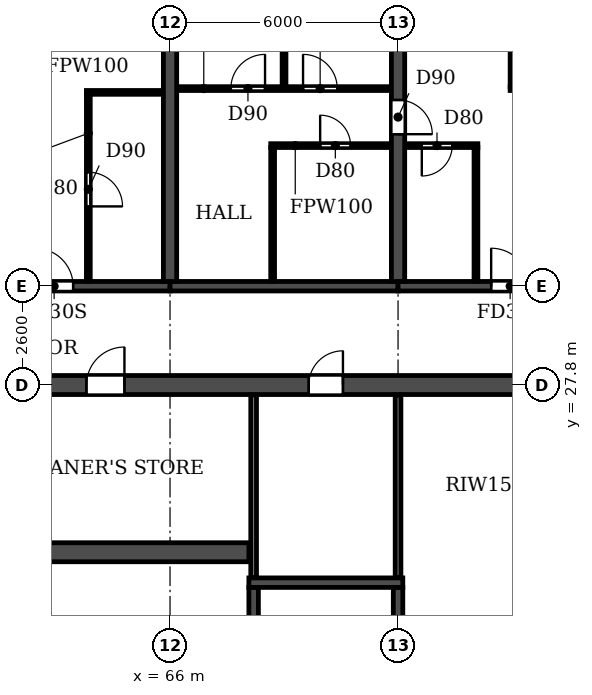
"""IFC4 building model, lengths in metres.
Left out: names, types, materials, properties, quantities, classifications, styles, units other than length and angle.
Written with IfcOpenShell. Run it as: python <this file> out.ifc"""

import sys

from ifc_helpers import new_model, si_unit, direction, frame, frame_2d, origin, place, context, subcontext, project, spatial, rectangle, extrude, element, fill, save


model = new_model("IFC4")
c1 = context("Model", 3, precision=1e-05, world=origin(), true_north=direction((0.0, 1.0)))
c2 = subcontext(c1, "Body", "Model", "MODEL_VIEW")
j1 = project(units=[si_unit("LENGTHUNIT", "METRE"), si_unit("PLANEANGLEUNIT", "RADIAN")], contexts=[c1])
p1 = place(None, origin())
s1 = spatial("IfcSite", under=j1, at=p1, CompositionType="ELEMENT")
p2 = place(p1, origin())
s2 = spatial("IfcBuilding", under=s1, at=p2, CompositionType="ELEMENT")
p3 = place(p2, frame((0.0, 0.0, 102.6)))
s3 = spatial("IfcBuildingStorey", under=s2, at=p3, CompositionType="ELEMENT", Elevation=102.6)
p4 = place(p3, frame((66.0, 30.525, 0.0), z_axis=(0.0, 0.0, 1.0), x_axis=(0.0, 1.0, 0.0)))
e1 = element("IfcWall", 1, at=p4, inside=s3, PredefinedType="SHEAR", context=c2, shape_type="SweptSolid", body=[
    extrude(rectangle(XDim=12.875, YDim=0.35, at=frame_2d((6.438, 0.0))), origin(), (0.0, 0.0, 1.0), 3.0),
])
p5 = place(p3, frame((72.0, 30.525, 0.0), z_axis=(0.0, 0.0, 1.0), x_axis=(0.0, 1.0, 0.0)))
e2 = element("IfcWall", 2, at=p5, inside=s3, PredefinedType="SHEAR", context=c2, shape_type="SweptSolid", body=[
    extrude(rectangle(XDim=12.875, YDim=0.35, at=frame_2d((6.438, 0.0))), origin(), (0.0, 0.0, 1.0), 3.0),
])
p6 = place(p5, frame((3.875, 0.0, 0.0)))
e3 = element("IfcOpeningElement", 3, at=p6, cuts=e2, PredefinedType="OPENING", context=c2, shape_type="SweptSolid", body=[
    extrude(rectangle(XDim=0.9, YDim=2.1, at=frame_2d((0.45, 1.05))), frame((0.0, 0.185, 0.0), z_axis=(0.0, -1.0, 0.0), x_axis=(1.0, 0.0, 0.0)), (0.0, 0.0, 1.0), 0.37),
])
p7 = place(p3, frame((60.0, 30.4, 0.0), z_axis=(0.0, 0.0, 1.0), x_axis=(1.0, 0.0, 0.0)))
e4 = element("IfcWall", 4, at=p7, inside=s3, PredefinedType="SHEAR", context=c2, shape_type="SweptSolid", body=[
    extrude(rectangle(XDim=6.0, YDim=0.25, at=frame_2d((3.0, 0.0))), origin(), (0.0, 0.0, 1.0), 2.4),
])
p8 = place(p7, frame((2.45, 0.0, 0.0)))
e5 = element("IfcOpeningElement", 5, at=p8, cuts=e4, PredefinedType="OPENING", context=c2, shape_type="SweptSolid", body=[
    extrude(rectangle(XDim=1.0, YDim=2.1, at=frame_2d((0.5, 1.05))), frame((0.0, 0.135, 0.0), z_axis=(0.0, -1.0, 0.0), x_axis=(1.0, 0.0, 0.0)), (0.0, 0.0, 1.0), 0.27),
])
p9 = place(p3, frame((66.0, 30.4, 0.0), z_axis=(0.0, 0.0, 1.0), x_axis=(1.0, 0.0, 0.0)))
e6 = element("IfcWall", 6, at=p9, inside=s3, PredefinedType="SHEAR", context=c2, shape_type="SweptSolid", body=[
    extrude(rectangle(XDim=6.0, YDim=0.25, at=frame_2d((3.0, 0.0))), origin(), (0.0, 0.0, 1.0), 2.4),
])
p10 = place(p3, frame((72.0, 30.4, 0.0), z_axis=(0.0, 0.0, 1.0), x_axis=(1.0, 0.0, 0.0)))
e7 = element("IfcWall", 7, at=p10, inside=s3, PredefinedType="SHEAR", context=c2, shape_type="SweptSolid", body=[
    extrude(rectangle(XDim=6.0, YDim=0.25, at=frame_2d((3.0, 0.0))), origin(), (0.0, 0.0, 1.0), 2.4),
])
p11 = place(p10, frame((2.45, 0.0, 0.0)))
e8 = element("IfcOpeningElement", 8, at=p11, cuts=e7, PredefinedType="OPENING", context=c2, shape_type="SweptSolid", body=[
    extrude(rectangle(XDim=1.0, YDim=2.1, at=frame_2d((0.5, 1.05))), frame((0.0, 0.135, 0.0), z_axis=(0.0, -1.0, 0.0), x_axis=(1.0, 0.0, 0.0)), (0.0, 0.0, 1.0), 0.27),
])
p12 = place(p3, frame((8.6, 27.8, 0.0), z_axis=(0.0, 0.0, 1.0), x_axis=(1.0, 0.0, 0.0)))
e9 = element("IfcWall", 9, at=p12, inside=s3, PredefinedType="SOLIDWALL", context=c2, shape_type="SweptSolid", body=[
    extrude(rectangle(XDim=84.8, YDim=0.5, at=frame_2d((42.4, 0.0))), origin(), (0.0, 0.0, 1.0), 3.0),
])
p13 = place(p12, frame((1.35, 0.0, 0.0)))
e10 = element("IfcOpeningElement", 10, at=p13, cuts=e9, PredefinedType="OPENING", context=c2, shape_type="SweptSolid", body=[
    extrude(rectangle(XDim=1.0, YDim=2.1, at=frame_2d((0.5, 1.05))), frame((0.0, 0.26, 0.0), z_axis=(0.0, -1.0, 0.0), x_axis=(1.0, 0.0, 0.0)), (0.0, 0.0, 1.0), 0.52),
])
p14 = place(p12, frame((6.05, 0.0, 0.0)))
e11 = element("IfcOpeningElement", 11, at=p14, cuts=e9, PredefinedType="OPENING", context=c2, shape_type="SweptSolid", body=[
    extrude(rectangle(XDim=1.0, YDim=2.1, at=frame_2d((0.5, 1.05))), frame((0.0, 0.26, 0.0), z_axis=(0.0, -1.0, 0.0), x_axis=(1.0, 0.0, 0.0)), (0.0, 0.0, 1.0), 0.52),
])
p15 = place(p12, frame((10.3, 0.0, 0.0)))
e12 = element("IfcOpeningElement", 12, at=p15, cuts=e9, PredefinedType="OPENING", context=c2, shape_type="SweptSolid", body=[
    extrude(rectangle(XDim=1.0, YDim=2.1, at=frame_2d((0.5, 1.05))), frame((0.0, 0.26, 0.0), z_axis=(0.0, -1.0, 0.0), x_axis=(1.0, 0.0, 0.0)), (0.0, 0.0, 1.0), 0.52),
])
p16 = place(p12, frame((13.65, 0.0, 0.0)))
e13 = element("IfcOpeningElement", 13, at=p16, cuts=e9, PredefinedType="OPENING", context=c2, shape_type="SweptSolid", body=[
    extrude(rectangle(XDim=0.9, YDim=2.1, at=frame_2d((0.45, 1.05))), frame((0.0, 0.26, 0.0), z_axis=(0.0, -1.0, 0.0), x_axis=(1.0, 0.0, 0.0)), (0.0, 0.0, 1.0), 0.52),
])
p17 = place(p12, frame((22.85, 0.0, 0.0)))
e14 = element("IfcOpeningElement", 14, at=p17, cuts=e9, PredefinedType="OPENING", context=c2, shape_type="SweptSolid", body=[
    extrude(rectangle(XDim=0.9, YDim=2.1, at=frame_2d((0.45, 1.05))), frame((0.0, 0.26, 0.0), z_axis=(0.0, -1.0, 0.0), x_axis=(1.0, 0.0, 0.0)), (0.0, 0.0, 1.0), 0.52),
])
p18 = place(p12, frame((28.6, 0.0, 0.0)))
e15 = element("IfcOpeningElement", 15, at=p18, cuts=e9, PredefinedType="OPENING", context=c2, shape_type="SweptSolid", body=[
    extrude(rectangle(XDim=1.0, YDim=2.1, at=frame_2d((0.5, 1.05))), frame((0.0, 0.26, 0.0), z_axis=(0.0, -1.0, 0.0), x_axis=(1.0, 0.0, 0.0)), (0.0, 0.0, 1.0), 0.52),
])
p19 = place(p12, frame((33.8, 0.0, 0.0)))
e16 = element("IfcOpeningElement", 16, at=p19, cuts=e9, PredefinedType="OPENING", context=c2, shape_type="SweptSolid", body=[
    extrude(rectangle(XDim=1.0, YDim=2.1, at=frame_2d((0.5, 1.05))), frame((0.0, 0.26, 0.0), z_axis=(0.0, -1.0, 0.0), x_axis=(1.0, 0.0, 0.0)), (0.0, 0.0, 1.0), 0.52),
])
p20 = place(p12, frame((39.0, 0.0, 0.0)))
e17 = element("IfcOpeningElement", 17, at=p20, cuts=e9, PredefinedType="OPENING", context=c2, shape_type="SweptSolid", body=[
    extrude(rectangle(XDim=1.0, YDim=2.1, at=frame_2d((0.5, 1.05))), frame((0.0, 0.26, 0.0), z_axis=(0.0, -1.0, 0.0), x_axis=(1.0, 0.0, 0.0)), (0.0, 0.0, 1.0), 0.52),
])
p21 = place(p12, frame((41.9, 0.0, 0.0)))
e18 = element("IfcOpeningElement", 18, at=p21, cuts=e9, PredefinedType="OPENING", context=c2, shape_type="SweptSolid", body=[
    extrude(rectangle(XDim=1.0, YDim=2.1, at=frame_2d((0.5, 1.05))), frame((0.0, 0.26, 0.0), z_axis=(0.0, -1.0, 0.0), x_axis=(1.0, 0.0, 0.0)), (0.0, 0.0, 1.0), 0.52),
])
p22 = place(p12, frame((44.8, 0.0, 0.0)))
e19 = element("IfcOpeningElement", 19, at=p22, cuts=e9, PredefinedType="OPENING", context=c2, shape_type="SweptSolid", body=[
    extrude(rectangle(XDim=1.0, YDim=2.1, at=frame_2d((0.5, 1.05))), frame((0.0, 0.26, 0.0), z_axis=(0.0, -1.0, 0.0), x_axis=(1.0, 0.0, 0.0)), (0.0, 0.0, 1.0), 0.52),
])
p23 = place(p12, frame((48.7, 0.0, 0.0)))
e20 = element("IfcOpeningElement", 20, at=p23, cuts=e9, PredefinedType="OPENING", context=c2, shape_type="SweptSolid", body=[
    extrude(rectangle(XDim=1.0, YDim=2.1, at=frame_2d((0.5, 1.05))), frame((0.0, 0.26, 0.0), z_axis=(0.0, -1.0, 0.0), x_axis=(1.0, 0.0, 0.0)), (0.0, 0.0, 1.0), 0.52),
])
p24 = place(p12, frame((55.2, 0.0, 0.0)))
e21 = element("IfcOpeningElement", 21, at=p24, cuts=e9, PredefinedType="OPENING", context=c2, shape_type="SweptSolid", body=[
    extrude(rectangle(XDim=1.0, YDim=2.1, at=frame_2d((0.5, 1.05))), frame((0.0, 0.26, 0.0), z_axis=(0.0, -1.0, 0.0), x_axis=(1.0, 0.0, 0.0)), (0.0, 0.0, 1.0), 0.52),
])
p25 = place(p12, frame((61.05, 0.0, 0.0)))
e22 = element("IfcOpeningElement", 22, at=p25, cuts=e9, PredefinedType="OPENING", context=c2, shape_type="SweptSolid", body=[
    extrude(rectangle(XDim=0.9, YDim=2.1, at=frame_2d((0.45, 1.05))), frame((0.0, 0.26, 0.0), z_axis=(0.0, -1.0, 0.0), x_axis=(1.0, 0.0, 0.0)), (0.0, 0.0, 1.0), 0.52),
])
p26 = place(p12, frame((70.25, 0.0, 0.0)))
e23 = element("IfcOpeningElement", 23, at=p26, cuts=e9, PredefinedType="OPENING", context=c2, shape_type="SweptSolid", body=[
    extrude(rectangle(XDim=0.9, YDim=2.1, at=frame_2d((0.45, 1.05))), frame((0.0, 0.26, 0.0), z_axis=(0.0, -1.0, 0.0), x_axis=(1.0, 0.0, 0.0)), (0.0, 0.0, 1.0), 0.52),
])
p27 = place(p12, frame((73.5, 0.0, 0.0)))
e24 = element("IfcOpeningElement", 24, at=p27, cuts=e9, PredefinedType="OPENING", context=c2, shape_type="SweptSolid", body=[
    extrude(rectangle(XDim=1.0, YDim=2.1, at=frame_2d((0.5, 1.05))), frame((0.0, 0.26, 0.0), z_axis=(0.0, -1.0, 0.0), x_axis=(1.0, 0.0, 0.0)), (0.0, 0.0, 1.0), 0.52),
])
p28 = place(p12, frame((77.95, 0.0, 0.0)))
e25 = element("IfcOpeningElement", 25, at=p28, cuts=e9, PredefinedType="OPENING", context=c2, shape_type="SweptSolid", body=[
    extrude(rectangle(XDim=1.5, YDim=2.1, at=frame_2d((0.75, 1.05))), frame((0.0, 0.26, 0.0), z_axis=(0.0, -1.0, 0.0), x_axis=(1.0, 0.0, 0.0)), (0.0, 0.0, 1.0), 0.52),
])
p29 = place(p12, frame((82.9, 0.0, 0.0)))
e26 = element("IfcOpeningElement", 26, at=p29, cuts=e9, PredefinedType="OPENING", context=c2, shape_type="SweptSolid", body=[
    extrude(rectangle(XDim=1.0, YDim=2.1, at=frame_2d((0.5, 1.05))), frame((0.0, 0.26, 0.0), z_axis=(0.0, -1.0, 0.0), x_axis=(1.0, 0.0, 0.0)), (0.0, 0.0, 1.0), 0.52),
])
p30 = place(p3, frame((33.925, 23.4, 0.0), z_axis=(0.0, 0.0, 1.0), x_axis=(1.0, 0.0, 0.0)))
e27 = element("IfcWall", 27, at=p30, inside=s3, PredefinedType="SOLIDWALL", context=c2, shape_type="SweptSolid", body=[
    extrude(rectangle(XDim=34.15, YDim=0.5, at=frame_2d((17.075, 0.0))), origin(), (0.0, 0.0, 1.0), 3.0),
])
p31 = place(p30, frame((16.175, 0.0, 0.0)))
e28 = element("IfcOpeningElement", 28, at=p31, cuts=e27, PredefinedType="OPENING", context=c2, shape_type="SweptSolid", body=[
    extrude(rectangle(XDim=1.8, YDim=2.1, at=frame_2d((0.9, 1.05))), frame((0.0, 0.26, 0.0), z_axis=(0.0, -1.0, 0.0), x_axis=(1.0, 0.0, 0.0)), (0.0, 0.0, 1.0), 0.52),
])
p32 = place(p30, frame((11.025, 0.0, 0.0)))
e29 = element("IfcOpeningElement", 29, at=p32, cuts=e27, PredefinedType="OPENING", context=c2, shape_type="SweptSolid", body=[
    extrude(rectangle(XDim=1.1, YDim=2.1, at=frame_2d((0.55, 1.05))), frame((0.0, 0.26, 0.0), z_axis=(0.0, -1.0, 0.0), x_axis=(1.0, 0.0, 0.0)), (0.0, 0.0, 1.0), 0.52),
])
p33 = place(p3, frame((68.2, 14.85, 0.0), z_axis=(0.0, 0.0, 1.0), x_axis=(0.0, 1.0, 0.0)))
e30 = element("IfcWall", 30, at=p33, inside=s3, PredefinedType="SOLIDWALL", context=c2, shape_type="SweptSolid", body=[
    extrude(rectangle(XDim=7.625, YDim=0.25, at=frame_2d((3.812, 0.0))), origin(), (0.0, 0.0, 1.0), 3.0),
])
p34 = place(p33, frame((0.45, 0.0, 0.0)))
e31 = element("IfcOpeningElement", 31, at=p34, cuts=e30, PredefinedType="OPENING", context=c2, shape_type="SweptSolid", body=[
    extrude(rectangle(XDim=1.0, YDim=2.1, at=frame_2d((0.5, 1.05))), frame((0.0, 0.135, 0.0), z_axis=(0.0, -1.0, 0.0), x_axis=(1.0, 0.0, 0.0)), (0.0, 0.0, 1.0), 0.27),
])
p35 = place(p3, frame((72.0, 14.85, 0.0), z_axis=(0.0, 0.0, 1.0), x_axis=(0.0, 1.0, 0.0)))
e32 = element("IfcWall", 32, at=p35, inside=s3, PredefinedType="SOLIDWALL", context=c2, shape_type="SweptSolid", body=[
    extrude(rectangle(XDim=7.625, YDim=0.25, at=frame_2d((3.812, 0.0))), origin(), (0.0, 0.0, 1.0), 3.0),
])
p36 = place(p3, frame((68.075, 22.6, 0.0), z_axis=(0.0, 0.0, 1.0), x_axis=(1.0, 0.0, 0.0)))
e33 = element("IfcWall", 33, at=p36, inside=s3, PredefinedType="SOLIDWALL", context=c2, shape_type="SweptSolid", body=[
    extrude(rectangle(XDim=4.05, YDim=0.25, at=frame_2d((2.025, 0.0))), origin(), (0.0, 0.0, 1.0), 3.0),
])
p37 = place(p3, frame((68.65, 34.1, 0.0), z_axis=(0.0, 0.0, 1.0), x_axis=(1.0, 0.0, 0.0)))
e34 = element("IfcWall", 34, at=p37, inside=s3, PredefinedType="PARTITIONING", context=c2, shape_type="SweptSolid", body=[
    extrude(rectangle(XDim=3.165, YDim=0.1, at=frame_2d((1.583, 0.0))), origin(), (0.0, 0.0, 1.0), 3.0),
])
p38 = place(p37, frame((1.3, 0.0, 0.0)))
e35 = element("IfcOpeningElement", 35, at=p38, cuts=e34, PredefinedType="OPENING", context=c2, shape_type="SweptSolid", body=[
    extrude(rectangle(XDim=0.8, YDim=2.1, at=frame_2d((0.4, 1.05))), frame((0.0, 0.06, 0.0), z_axis=(0.0, -1.0, 0.0), x_axis=(1.0, 0.0, 0.0)), (0.0, 0.0, 1.0), 0.12),
])
p39 = place(p3, frame((72.185, 34.1, 0.0), z_axis=(0.0, 0.0, 1.0), x_axis=(1.0, 0.0, 0.0)))
e36 = element("IfcWall", 36, at=p39, inside=s3, PredefinedType="PARTITIONING", context=c2, shape_type="SweptSolid", body=[
    extrude(rectangle(XDim=1.915, YDim=0.1, at=frame_2d((0.958, 0.0))), origin(), (0.0, 0.0, 1.0), 3.0),
])
p40 = place(p39, frame((0.44, 0.0, 0.0)))
e37 = element("IfcOpeningElement", 37, at=p40, cuts=e36, PredefinedType="OPENING", context=c2, shape_type="SweptSolid", body=[
    extrude(rectangle(XDim=0.8, YDim=2.1, at=frame_2d((0.4, 1.05))), frame((0.0, 0.06, 0.0), z_axis=(0.0, -1.0, 0.0), x_axis=(1.0, 0.0, 0.0)), (0.0, 0.0, 1.0), 0.12),
])
p41 = place(p3, frame((63.8, 35.5, 0.0), z_axis=(0.0, 0.0, 1.0), x_axis=(1.0, 0.0, 0.0)))
e38 = element("IfcWall", 38, at=p41, inside=s3, PredefinedType="PARTITIONING", context=c2, shape_type="SweptSolid", body=[
    extrude(rectangle(XDim=2.015, YDim=0.1, at=frame_2d((1.007, 0.0))), origin(), (0.0, 0.0, 1.0), 3.0),
])
p42 = place(p3, frame((66.185, 35.6, 0.0), z_axis=(0.0, 0.0, 1.0), x_axis=(1.0, 0.0, 0.0)))
e39 = element("IfcWall", 39, at=p42, inside=s3, PredefinedType="PARTITIONING", context=c2, shape_type="SweptSolid", body=[
    extrude(rectangle(XDim=5.63, YDim=0.1, at=frame_2d((2.815, 0.0))), origin(), (0.0, 0.0, 1.0), 3.0),
])
p43 = place(p42, frame((1.415, 0.0, 0.0)))
e40 = element("IfcOpeningElement", 40, at=p43, cuts=e39, PredefinedType="OPENING", context=c2, shape_type="SweptSolid", body=[
    extrude(rectangle(XDim=0.9, YDim=2.1, at=frame_2d((0.45, 1.05))), frame((0.0, 0.06, 0.0), z_axis=(0.0, -1.0, 0.0), x_axis=(1.0, 0.0, 0.0)), (0.0, 0.0, 1.0), 0.12),
])
p44 = place(p42, frame((3.315, 0.0, 0.0)))
e41 = element("IfcOpeningElement", 41, at=p44, cuts=e39, PredefinedType="OPENING", context=c2, shape_type="SweptSolid", body=[
    extrude(rectangle(XDim=0.9, YDim=2.1, at=frame_2d((0.45, 1.05))), frame((0.0, 0.06, 0.0), z_axis=(0.0, -1.0, 0.0), x_axis=(1.0, 0.0, 0.0)), (0.0, 0.0, 1.0), 0.12),
])
p45 = place(p3, frame((74.95, 35.6, 0.0), z_axis=(0.0, 0.0, 1.0), x_axis=(1.0, 0.0, 0.0)))
e42 = element("IfcWall", 42, at=p45, inside=s3, PredefinedType="PARTITIONING", context=c2, shape_type="SweptSolid", body=[
    extrude(rectangle(XDim=2.865, YDim=0.1, at=frame_2d((1.433, 0.0))), origin(), (0.0, 0.0, 1.0), 3.0),
])
p46 = place(p45, frame((1.65, 0.0, 0.0)))
e43 = element("IfcOpeningElement", 43, at=p46, cuts=e42, PredefinedType="OPENING", context=c2, shape_type="SweptSolid", body=[
    extrude(rectangle(XDim=0.9, YDim=2.1, at=frame_2d((0.45, 1.05))), frame((0.0, 0.06, 0.0), z_axis=(0.0, -1.0, 0.0), x_axis=(1.0, 0.0, 0.0)), (0.0, 0.0, 1.0), 0.12),
])
p47 = place(p3, frame((63.85, 30.535, 0.0), z_axis=(0.0, 0.0, 1.0), x_axis=(0.0, 1.0, 0.0)))
e44 = element("IfcWall", 44, at=p47, inside=s3, PredefinedType="PARTITIONING", context=c2, shape_type="SweptSolid", body=[
    extrude(rectangle(XDim=4.915, YDim=0.1, at=frame_2d((2.458, 0.0))), origin(), (0.0, 0.0, 1.0), 3.0),
])
p48 = place(p47, frame((1.965, 0.0, 0.0)))
e45 = element("IfcOpeningElement", 45, at=p48, cuts=e44, PredefinedType="OPENING", context=c2, shape_type="SweptSolid", body=[
    extrude(rectangle(XDim=0.9, YDim=2.1, at=frame_2d((0.45, 1.05))), frame((0.0, 0.06, 0.0), z_axis=(0.0, -1.0, 0.0), x_axis=(1.0, 0.0, 0.0)), (0.0, 0.0, 1.0), 0.12),
])
p49 = place(p3, frame((68.7, 30.535, 0.0), z_axis=(0.0, 0.0, 1.0), x_axis=(0.0, 1.0, 0.0)))
e46 = element("IfcWall", 46, at=p49, inside=s3, PredefinedType="PARTITIONING", context=c2, shape_type="SweptSolid", body=[
    extrude(rectangle(XDim=3.515, YDim=0.1, at=frame_2d((1.758, 0.0))), origin(), (0.0, 0.0, 1.0), 3.0),
])
p50 = place(p3, frame((69.0, 35.65, 0.0), z_axis=(0.0, 0.0, 1.0), x_axis=(0.0, 1.0, 0.0)))
e47 = element("IfcWall", 47, at=p50, inside=s3, PredefinedType="PARTITIONING", context=c2, shape_type="SweptSolid", body=[
    extrude(rectangle(XDim=7.89, YDim=0.1, at=frame_2d((3.945, 0.0))), origin(), (0.0, 0.0, 1.0), 3.0),
])
p51 = place(p3, frame((74.05, 30.535, 0.0), z_axis=(0.0, 0.0, 1.0), x_axis=(0.0, 1.0, 0.0)))
e48 = element("IfcWall", 48, at=p51, inside=s3, PredefinedType="PARTITIONING", context=c2, shape_type="SweptSolid", body=[
    extrude(rectangle(XDim=3.515, YDim=0.1, at=frame_2d((1.758, 0.0))), origin(), (0.0, 0.0, 1.0), 3.0),
])
p52 = place(p3, frame((75.0, 35.65, 0.0), z_axis=(0.0, 0.0, 1.0), x_axis=(0.0, 1.0, 0.0)))
e49 = element("IfcWall", 49, at=p52, inside=s3, PredefinedType="PARTITIONING", context=c2, shape_type="SweptSolid", body=[
    extrude(rectangle(XDim=7.89, YDim=0.1, at=frame_2d((3.945, 0.0))), origin(), (0.0, 0.0, 1.0), 3.0),
])
for number, where, z_axis, x_axis in (
    (50, (68.2, 22.735, 0.0), (0.0, 0.0, 1.0), (0.0, 1.0, 0.0)),
    (51, (72.0, 22.735, 0.0), (0.0, 0.0, 1.0), (0.0, 1.0, 0.0)),
):
    element("IfcWall", number, at=place(p3, frame(where, z_axis=z_axis, x_axis=x_axis)), inside=s3, PredefinedType="PARTITIONING", context=c2, shape_type="SweptSolid", body=[
        extrude(rectangle(XDim=4.805, YDim=0.15, at=frame_2d((2.402, 0.0))), origin(), (0.0, 0.0, 1.0), 3.0),
    ])
p53 = place(p24, origin())
e52 = element("IfcDoor", 52, at=p53, inside=s3, OperationType="SINGLE_SWING_RIGHT", PredefinedType="DOOR", context=c2, shape_type="SweptSolid", body=[
    extrude(rectangle(XDim=1.0, YDim=2.1, at=frame_2d((0.5, 1.05))), frame((0.0, 0.025, 0.0), z_axis=(0.0, -1.0, 0.0), x_axis=(1.0, 0.0, 0.0)), (0.0, 0.0, 1.0), 0.05),
])
fill(e21, e52)
p54 = place(p25, origin())
e53 = element("IfcDoor", 53, at=p54, inside=s3, OperationType="SINGLE_SWING_RIGHT", PredefinedType="DOOR", context=c2, shape_type="SweptSolid", body=[
    extrude(rectangle(XDim=0.9, YDim=2.1, at=frame_2d((0.45, 1.05))), frame((0.0, 0.025, 0.0), z_axis=(0.0, -1.0, 0.0), x_axis=(1.0, 0.0, 0.0)), (0.0, 0.0, 1.0), 0.05),
])
fill(e22, e53)
p55 = place(p8, origin())
e54 = element("IfcDoor", 54, at=p55, inside=s3, OperationType="SINGLE_SWING_LEFT", PredefinedType="DOOR", context=c2, shape_type="SweptSolid", body=[
    extrude(rectangle(XDim=1.0, YDim=2.1, at=frame_2d((0.5, 1.05))), frame((0.0, 0.025, 0.0), z_axis=(0.0, -1.0, 0.0), x_axis=(1.0, 0.0, 0.0)), (0.0, 0.0, 1.0), 0.05),
])
fill(e5, e54)
p56 = place(p48, frame((0.9, 0.0, 0.0), z_axis=(0.0, 0.0, 1.0), x_axis=(-1.0, 0.0, 0.0)))
e55 = element("IfcDoor", 55, at=p56, inside=s3, OperationType="SINGLE_SWING_RIGHT", PredefinedType="DOOR", context=c2, shape_type="SweptSolid", body=[
    extrude(rectangle(XDim=0.9, YDim=2.1, at=frame_2d((0.45, 1.05))), frame((0.0, 0.025, 0.0), z_axis=(0.0, -1.0, 0.0), x_axis=(1.0, 0.0, 0.0)), (0.0, 0.0, 1.0), 0.05),
])
fill(e45, e55)
p57 = place(p43, origin())
e56 = element("IfcDoor", 56, at=p57, inside=s3, OperationType="SINGLE_SWING_RIGHT", PredefinedType="DOOR", context=c2, shape_type="SweptSolid", body=[
    extrude(rectangle(XDim=0.9, YDim=2.1, at=frame_2d((0.45, 1.05))), frame((0.0, 0.025, 0.0), z_axis=(0.0, -1.0, 0.0), x_axis=(1.0, 0.0, 0.0)), (0.0, 0.0, 1.0), 0.05),
])
fill(e40, e56)
p58 = place(p44, origin())
e57 = element("IfcDoor", 57, at=p58, inside=s3, OperationType="SINGLE_SWING_LEFT", PredefinedType="DOOR", context=c2, shape_type="SweptSolid", body=[
    extrude(rectangle(XDim=0.9, YDim=2.1, at=frame_2d((0.45, 1.05))), frame((0.0, 0.025, 0.0), z_axis=(0.0, -1.0, 0.0), x_axis=(1.0, 0.0, 0.0)), (0.0, 0.0, 1.0), 0.05),
])
fill(e41, e57)
p59 = place(p38, origin())
e58 = element("IfcDoor", 58, at=p59, inside=s3, OperationType="SINGLE_SWING_LEFT", PredefinedType="DOOR", context=c2, shape_type="SweptSolid", body=[
    extrude(rectangle(XDim=0.8, YDim=2.1, at=frame_2d((0.4, 1.05))), frame((0.0, 0.025, 0.0), z_axis=(0.0, -1.0, 0.0), x_axis=(1.0, 0.0, 0.0)), (0.0, 0.0, 1.0), 0.05),
])
fill(e35, e58)
p60 = place(p6, frame((0.9, 0.0, 0.0), z_axis=(0.0, 0.0, 1.0), x_axis=(-1.0, 0.0, 0.0)))
e59 = element("IfcDoor", 59, at=p60, inside=s3, OperationType="SINGLE_SWING_RIGHT", PredefinedType="DOOR", context=c2, shape_type="SweptSolid", body=[
    extrude(rectangle(XDim=0.9, YDim=2.1, at=frame_2d((0.45, 1.05))), frame((0.0, 0.025, 0.0), z_axis=(0.0, -1.0, 0.0), x_axis=(1.0, 0.0, 0.0)), (0.0, 0.0, 1.0), 0.05),
])
fill(e3, e59)
p61 = place(p40, frame((0.8, 0.0, 0.0), z_axis=(0.0, 0.0, 1.0), x_axis=(-1.0, 0.0, 0.0)))
e60 = element("IfcDoor", 60, at=p61, inside=s3, OperationType="SINGLE_SWING_RIGHT", PredefinedType="DOOR", context=c2, shape_type="SweptSolid", body=[
    extrude(rectangle(XDim=0.8, YDim=2.1, at=frame_2d((0.4, 1.05))), frame((0.0, 0.025, 0.0), z_axis=(0.0, -1.0, 0.0), x_axis=(1.0, 0.0, 0.0)), (0.0, 0.0, 1.0), 0.05),
])
fill(e37, e60)
p62 = place(p11, origin())
e61 = element("IfcDoor", 61, at=p62, inside=s3, OperationType="SINGLE_SWING_LEFT", PredefinedType="DOOR", context=c2, shape_type="SweptSolid", body=[
    extrude(rectangle(XDim=1.0, YDim=2.1, at=frame_2d((0.5, 1.05))), frame((0.0, 0.025, 0.0), z_axis=(0.0, -1.0, 0.0), x_axis=(1.0, 0.0, 0.0)), (0.0, 0.0, 1.0), 0.05),
])
fill(e8, e61)
save(model, sys.argv[1])
